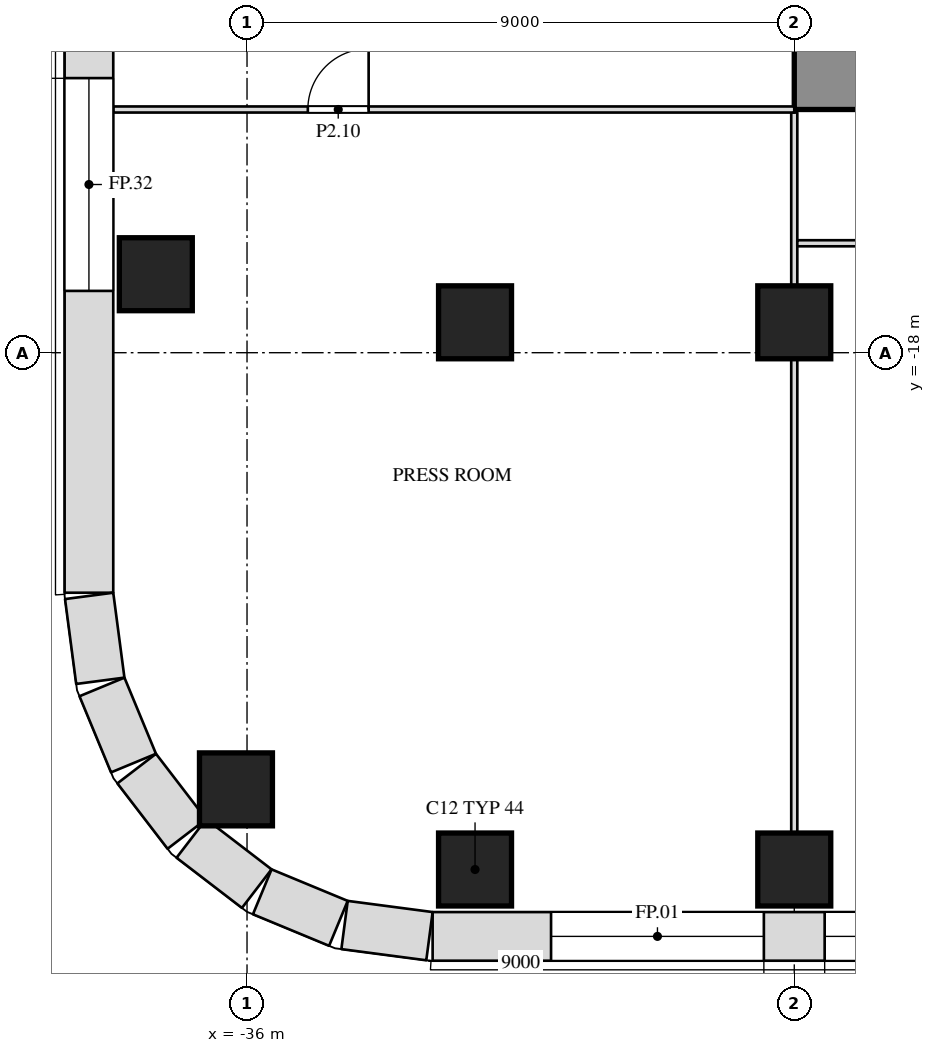
"""IFC4 building model, lengths in metres.
Left out: names, types, materials, properties, quantities, classifications, styles, units other than length and angle.
Written with IfcOpenShell. Run it as: python <this file> out.ifc"""

import sys

from ifc_helpers import new_model, si_unit, direction, frame, frame_2d, origin, origin_2d, place, context, subcontext, project, spatial, rectangle, extrude, element, fill, save


model = new_model("IFC4")
c1 = context("Model", 3, precision=1e-05, world=origin(), true_north=direction((0.0, 1.0)))
c2 = subcontext(c1, "Body", "Model", "MODEL_VIEW")
j1 = project(units=[si_unit("LENGTHUNIT", "METRE"), si_unit("PLANEANGLEUNIT", "RADIAN")], contexts=[c1])
p1 = place(None, origin())
s1 = spatial("IfcSite", under=j1, at=p1, CompositionType="ELEMENT")
p2 = place(p1, origin())
s2 = spatial("IfcBuilding", under=s1, at=p2, CompositionType="ELEMENT")
p3 = place(p2, frame((0.0, 0.0, 15.0)))
s3 = spatial("IfcBuildingStorey", under=s2, at=p3, CompositionType="ELEMENT", Elevation=15.0)
for number, where, z_axis, x_axis in (
    (1, (-32.25, -26.5, 0.0), (0.0, 0.0, 1.0), (1.0, 0.0, 0.0)),
    (2, (-27.0, -26.5, 0.0), (0.0, 0.0, 1.0), (1.0, 0.0, 0.0)),
    (3, (-36.182, -25.182, 0.0), (0.0, 0.0, 1.0), (1.0, 0.0, 0.0)),
    (4, (-32.25, -17.5, 0.0), (0.0, 0.0, 1.0), (1.0, 0.0, 0.0)),
    (5, (-27.0, -17.5, 0.0), (0.0, 0.0, 1.0), (1.0, 0.0, 0.0)),
    (6, (-37.5, -16.709, 0.0), (0.0, 0.0, 1.0), (1.0, 0.0, 0.0)),
):
    element("IfcColumn", number, at=place(p3, frame(where, z_axis=z_axis, x_axis=x_axis)), inside=s3, PredefinedType="COLUMN", context=c2, shape_type="SweptSolid", body=[
        extrude(rectangle(XDim=1.2, YDim=1.2, at=origin_2d()), origin(), (0.0, 0.0, 1.0), 6.0),
    ])
p4 = place(p3, frame((-27.0, -13.4, 0.0), z_axis=(0.0, 0.0, 1.0), x_axis=(1.0, 0.0, 0.0)))
e7 = element("IfcWall", 7, at=p4, inside=s3, PredefinedType="SHEAR", context=c2, shape_type="SweptSolid", body=[
    extrude(rectangle(XDim=54.0, YDim=1.2, at=frame_2d((27.0, 0.0))), origin(), (0.0, 0.0, 1.0), 5.7),
])
p5 = place(p4, frame((16.45, 0.0, 0.0)))
e8 = element("IfcOpeningElement", 8, at=p5, cuts=e7, PredefinedType="OPENING", context=c2, shape_type="SweptSolid", body=[
    extrude(rectangle(XDim=1.0, YDim=2.1, at=frame_2d((0.5, 1.05))), frame((0.0, 0.612, 0.0), z_axis=(0.0, -1.0, 0.0), x_axis=(1.0, 0.0, 0.0)), (0.0, 0.0, 1.0), 1.224),
])
p6 = place(p4, frame((36.55, 0.0, 0.0)))
e9 = element("IfcOpeningElement", 9, at=p6, cuts=e7, PredefinedType="OPENING", context=c2, shape_type="SweptSolid", body=[
    extrude(rectangle(XDim=1.0, YDim=2.1, at=frame_2d((0.5, 1.05))), frame((0.0, 0.612, 0.0), z_axis=(0.0, -1.0, 0.0), x_axis=(1.0, 0.0, 0.0)), (0.0, 0.0, 1.0), 1.224),
])
p7 = place(p3, frame((-27.0, -25.9, 0.0), z_axis=(0.0, 0.0, 1.0), x_axis=(0.0, 1.0, 0.0)))
e10 = element("IfcWall", 10, at=p7, inside=s3, PredefinedType="PARTITIONING", context=c2, shape_type="SweptSolid", body=[
    extrude(rectangle(XDim=7.8, YDim=0.1, at=frame_2d((3.9, 0.0))), origin(), (0.0, 0.0, 1.0), 5.088),
])
p8 = place(p3, frame((-27.0, -16.9, 0.0), z_axis=(0.0, 0.0, 1.0), x_axis=(0.0, 1.0, 0.0)))
e11 = element("IfcWall", 11, at=p8, inside=s3, PredefinedType="PARTITIONING", context=c2, shape_type="SweptSolid", body=[
    extrude(rectangle(XDim=2.85, YDim=0.1, at=frame_2d((1.425, 0.0))), origin(), (0.0, 0.0, 1.0), 5.088),
])
p9 = place(p3, frame((-26.95, -16.2, 0.0), z_axis=(0.0, 0.0, 1.0), x_axis=(1.0, 0.0, 0.0)))
e12 = element("IfcWall", 12, at=p9, inside=s3, PredefinedType="PARTITIONING", context=c2, shape_type="SweptSolid", body=[
    extrude(rectangle(XDim=53.9, YDim=0.1, at=frame_2d((26.95, 0.0))), origin(), (0.0, 0.0, 1.0), 5.7),
])
p10 = place(p9, frame((6.2, 0.0, 0.0)))
e13 = element("IfcOpeningElement", 13, at=p10, cuts=e12, PredefinedType="OPENING", context=c2, shape_type="SweptSolid", body=[
    extrude(rectangle(XDim=1.0, YDim=2.1, at=frame_2d((0.5, 1.05))), frame((0.0, 0.062, 0.0), z_axis=(0.0, -1.0, 0.0), x_axis=(1.0, 0.0, 0.0)), (0.0, 0.0, 1.0), 0.124),
])
p11 = place(p9, frame((15.2, 0.0, 0.0)))
e14 = element("IfcOpeningElement", 14, at=p11, cuts=e12, PredefinedType="OPENING", context=c2, shape_type="SweptSolid", body=[
    extrude(rectangle(XDim=1.0, YDim=2.1, at=frame_2d((0.5, 1.05))), frame((0.0, 0.062, 0.0), z_axis=(0.0, -1.0, 0.0), x_axis=(1.0, 0.0, 0.0)), (0.0, 0.0, 1.0), 0.124),
])
p12 = place(p9, frame((21.95, 0.0, 0.0)))
e15 = element("IfcOpeningElement", 15, at=p12, cuts=e12, PredefinedType="OPENING", context=c2, shape_type="SweptSolid", body=[
    extrude(rectangle(XDim=1.0, YDim=2.1, at=frame_2d((0.5, 1.05))), frame((0.0, 0.062, 0.0), z_axis=(0.0, -1.0, 0.0), x_axis=(1.0, 0.0, 0.0)), (0.0, 0.0, 1.0), 0.124),
])
p13 = place(p9, frame((30.95, 0.0, 0.0)))
e16 = element("IfcOpeningElement", 16, at=p13, cuts=e12, PredefinedType="OPENING", context=c2, shape_type="SweptSolid", body=[
    extrude(rectangle(XDim=1.0, YDim=2.1, at=frame_2d((0.5, 1.05))), frame((0.0, 0.062, 0.0), z_axis=(0.0, -1.0, 0.0), x_axis=(1.0, 0.0, 0.0)), (0.0, 0.0, 1.0), 0.124),
])
p14 = place(p9, frame((39.95, 0.0, 0.0)))
e17 = element("IfcOpeningElement", 17, at=p14, cuts=e12, PredefinedType="OPENING", context=c2, shape_type="SweptSolid", body=[
    extrude(rectangle(XDim=1.0, YDim=2.1, at=frame_2d((0.5, 1.05))), frame((0.0, 0.062, 0.0), z_axis=(0.0, -1.0, 0.0), x_axis=(1.0, 0.0, 0.0)), (0.0, 0.0, 1.0), 0.124),
])
p15 = place(p9, frame((48.95, 0.0, 0.0)))
e18 = element("IfcOpeningElement", 18, at=p15, cuts=e12, PredefinedType="OPENING", context=c2, shape_type="SweptSolid", body=[
    extrude(rectangle(XDim=1.0, YDim=2.1, at=frame_2d((0.5, 1.05))), frame((0.0, 0.062, 0.0), z_axis=(0.0, -1.0, 0.0), x_axis=(1.0, 0.0, 0.0)), (0.0, 0.0, 1.0), 0.124),
])
p16 = place(p3, frame((-38.2, -14.0, 0.0), z_axis=(0.0, 0.0, 1.0), x_axis=(1.0, 0.0, 0.0)))
e19 = element("IfcWall", 19, at=p16, inside=s3, PredefinedType="PARTITIONING", context=c2, shape_type="SweptSolid", body=[
    extrude(rectangle(XDim=11.2, YDim=0.1, at=frame_2d((5.6, 0.0))), origin(), (0.0, 0.0, 1.0), 5.7),
])
p17 = place(p16, frame((3.2, 0.0, 0.0)))
e20 = element("IfcOpeningElement", 20, at=p17, cuts=e19, PredefinedType="OPENING", context=c2, shape_type="SweptSolid", body=[
    extrude(rectangle(XDim=1.0, YDim=2.1, at=frame_2d((0.5, 1.05))), frame((0.0, 0.062, 0.0), z_axis=(0.0, -1.0, 0.0), x_axis=(1.0, 0.0, 0.0)), (0.0, 0.0, 1.0), 0.124),
])
p18 = place(p3, frame((-32.948, -27.6, 0.0), z_axis=(0.0, 0.0, 1.0), x_axis=(1.0, 0.0, 0.0)))
e21 = element("IfcWall", 21, at=p18, inside=s3, PredefinedType="SOLIDWALL", context=c2, shape_type="SweptSolid", body=[
    extrude(rectangle(XDim=65.895, YDim=0.8, at=frame_2d((32.948, 0.0))), origin(), (0.0, 0.0, 1.0), 5.7),
])
p19 = place(p18, frame((1.948, 0.0, 1.0)))
e22 = element("IfcOpeningElement", 22, at=p19, cuts=e21, PredefinedType="OPENING", context=c2, shape_type="SweptSolid", body=[
    extrude(rectangle(XDim=3.5, YDim=4.0, at=frame_2d((1.75, 2.0))), frame((0.0, 0.412, 0.0), z_axis=(0.0, -1.0, 0.0), x_axis=(1.0, 0.0, 0.0)), (0.0, 0.0, 1.0), 0.824),
])
p20 = place(p18, frame((6.448, 0.0, 1.0)))
e23 = element("IfcOpeningElement", 23, at=p20, cuts=e21, PredefinedType="OPENING", context=c2, shape_type="SweptSolid", body=[
    extrude(rectangle(XDim=3.5, YDim=4.0, at=frame_2d((1.75, 2.0))), frame((0.0, 0.412, 0.0), z_axis=(0.0, -1.0, 0.0), x_axis=(1.0, 0.0, 0.0)), (0.0, 0.0, 1.0), 0.824),
])
p21 = place(p18, frame((10.948, 0.0, 1.0)))
e24 = element("IfcOpeningElement", 24, at=p21, cuts=e21, PredefinedType="OPENING", context=c2, shape_type="SweptSolid", body=[
    extrude(rectangle(XDim=3.5, YDim=4.0, at=frame_2d((1.75, 2.0))), frame((0.0, 0.412, 0.0), z_axis=(0.0, -1.0, 0.0), x_axis=(1.0, 0.0, 0.0)), (0.0, 0.0, 1.0), 0.824),
])
p22 = place(p18, frame((15.448, 0.0, 1.0)))
e25 = element("IfcOpeningElement", 25, at=p22, cuts=e21, PredefinedType="OPENING", context=c2, shape_type="SweptSolid", body=[
    extrude(rectangle(XDim=3.5, YDim=4.0, at=frame_2d((1.75, 2.0))), frame((0.0, 0.412, 0.0), z_axis=(0.0, -1.0, 0.0), x_axis=(1.0, 0.0, 0.0)), (0.0, 0.0, 1.0), 0.824),
])
p23 = place(p18, frame((19.948, 0.0, 1.0)))
e26 = element("IfcOpeningElement", 26, at=p23, cuts=e21, PredefinedType="OPENING", context=c2, shape_type="SweptSolid", body=[
    extrude(rectangle(XDim=3.5, YDim=4.0, at=frame_2d((1.75, 2.0))), frame((0.0, 0.412, 0.0), z_axis=(0.0, -1.0, 0.0), x_axis=(1.0, 0.0, 0.0)), (0.0, 0.0, 1.0), 0.824),
])
p24 = place(p18, frame((24.448, 0.0, 1.0)))
e27 = element("IfcOpeningElement", 27, at=p24, cuts=e21, PredefinedType="OPENING", context=c2, shape_type="SweptSolid", body=[
    extrude(rectangle(XDim=3.5, YDim=4.0, at=frame_2d((1.75, 2.0))), frame((0.0, 0.412, 0.0), z_axis=(0.0, -1.0, 0.0), x_axis=(1.0, 0.0, 0.0)), (0.0, 0.0, 1.0), 0.824),
])
p25 = place(p18, frame((28.948, 0.0, 1.0)))
e28 = element("IfcOpeningElement", 28, at=p25, cuts=e21, PredefinedType="OPENING", context=c2, shape_type="SweptSolid", body=[
    extrude(rectangle(XDim=3.5, YDim=4.0, at=frame_2d((1.75, 2.0))), frame((0.0, 0.412, 0.0), z_axis=(0.0, -1.0, 0.0), x_axis=(1.0, 0.0, 0.0)), (0.0, 0.0, 1.0), 0.824),
])
p26 = place(p18, frame((33.448, 0.0, 1.0)))
e29 = element("IfcOpeningElement", 29, at=p26, cuts=e21, PredefinedType="OPENING", context=c2, shape_type="SweptSolid", body=[
    extrude(rectangle(XDim=3.5, YDim=4.0, at=frame_2d((1.75, 2.0))), frame((0.0, 0.412, 0.0), z_axis=(0.0, -1.0, 0.0), x_axis=(1.0, 0.0, 0.0)), (0.0, 0.0, 1.0), 0.824),
])
p27 = place(p18, frame((37.948, 0.0, 1.0)))
e30 = element("IfcOpeningElement", 30, at=p27, cuts=e21, PredefinedType="OPENING", context=c2, shape_type="SweptSolid", body=[
    extrude(rectangle(XDim=3.5, YDim=4.0, at=frame_2d((1.75, 2.0))), frame((0.0, 0.412, 0.0), z_axis=(0.0, -1.0, 0.0), x_axis=(1.0, 0.0, 0.0)), (0.0, 0.0, 1.0), 0.824),
])
p28 = place(p18, frame((42.448, 0.0, 1.0)))
e31 = element("IfcOpeningElement", 31, at=p28, cuts=e21, PredefinedType="OPENING", context=c2, shape_type="SweptSolid", body=[
    extrude(rectangle(XDim=3.5, YDim=4.0, at=frame_2d((1.75, 2.0))), frame((0.0, 0.412, 0.0), z_axis=(0.0, -1.0, 0.0), x_axis=(1.0, 0.0, 0.0)), (0.0, 0.0, 1.0), 0.824),
])
p29 = place(p18, frame((46.948, 0.0, 1.0)))
e32 = element("IfcOpeningElement", 32, at=p29, cuts=e21, PredefinedType="OPENING", context=c2, shape_type="SweptSolid", body=[
    extrude(rectangle(XDim=3.5, YDim=4.0, at=frame_2d((1.75, 2.0))), frame((0.0, 0.412, 0.0), z_axis=(0.0, -1.0, 0.0), x_axis=(1.0, 0.0, 0.0)), (0.0, 0.0, 1.0), 0.824),
])
p30 = place(p18, frame((51.448, 0.0, 1.0)))
e33 = element("IfcOpeningElement", 33, at=p30, cuts=e21, PredefinedType="OPENING", context=c2, shape_type="SweptSolid", body=[
    extrude(rectangle(XDim=3.5, YDim=4.0, at=frame_2d((1.75, 2.0))), frame((0.0, 0.412, 0.0), z_axis=(0.0, -1.0, 0.0), x_axis=(1.0, 0.0, 0.0)), (0.0, 0.0, 1.0), 0.824),
])
p31 = place(p18, frame((55.948, 0.0, 1.0)))
e34 = element("IfcOpeningElement", 34, at=p31, cuts=e21, PredefinedType="OPENING", context=c2, shape_type="SweptSolid", body=[
    extrude(rectangle(XDim=3.5, YDim=4.0, at=frame_2d((1.75, 2.0))), frame((0.0, 0.412, 0.0), z_axis=(0.0, -1.0, 0.0), x_axis=(1.0, 0.0, 0.0)), (0.0, 0.0, 1.0), 0.824),
])
p32 = place(p18, frame((60.448, 0.0, 1.0)))
e35 = element("IfcOpeningElement", 35, at=p32, cuts=e21, PredefinedType="OPENING", context=c2, shape_type="SweptSolid", body=[
    extrude(rectangle(XDim=3.5, YDim=4.0, at=frame_2d((1.75, 2.0))), frame((0.0, 0.412, 0.0), z_axis=(0.0, -1.0, 0.0), x_axis=(1.0, 0.0, 0.0)), (0.0, 0.0, 1.0), 0.824),
])
p33 = place(p3, frame((-38.6, 13.948, 0.0), z_axis=(0.0, 0.0, 1.0), x_axis=(0.0, -1.0, 0.0)))
e36 = element("IfcWall", 36, at=p33, inside=s3, PredefinedType="SOLIDWALL", context=c2, shape_type="SweptSolid", body=[
    extrude(rectangle(XDim=35.895, YDim=0.8, at=frame_2d((17.948, 0.0))), origin(), (0.0, 0.0, 1.0), 5.7),
])
p34 = place(p33, frame((4.964, 0.0, 1.0)))
e37 = element("IfcOpeningElement", 37, at=p34, cuts=e36, PredefinedType="OPENING", context=c2, shape_type="SweptSolid", body=[
    extrude(rectangle(XDim=3.5, YDim=4.0, at=frame_2d((1.75, 2.0))), frame((0.0, 0.412, 0.0), z_axis=(0.0, -1.0, 0.0), x_axis=(1.0, 0.0, 0.0)), (0.0, 0.0, 1.0), 0.824),
])
p35 = place(p33, frame((9.458, 0.0, 1.0)))
e38 = element("IfcOpeningElement", 38, at=p35, cuts=e36, PredefinedType="OPENING", context=c2, shape_type="SweptSolid", body=[
    extrude(rectangle(XDim=3.5, YDim=4.0, at=frame_2d((1.75, 2.0))), frame((0.0, 0.412, 0.0), z_axis=(0.0, -1.0, 0.0), x_axis=(1.0, 0.0, 0.0)), (0.0, 0.0, 1.0), 0.824),
])
p36 = place(p33, frame((13.951, 0.0, 1.0)))
e39 = element("IfcOpeningElement", 39, at=p36, cuts=e36, PredefinedType="OPENING", context=c2, shape_type="SweptSolid", body=[
    extrude(rectangle(XDim=3.5, YDim=4.0, at=frame_2d((1.75, 2.0))), frame((0.0, 0.412, 0.0), z_axis=(0.0, -1.0, 0.0), x_axis=(1.0, 0.0, 0.0)), (0.0, 0.0, 1.0), 0.824),
])
p37 = place(p33, frame((18.444, 0.0, 1.0)))
e40 = element("IfcOpeningElement", 40, at=p37, cuts=e36, PredefinedType="OPENING", context=c2, shape_type="SweptSolid", body=[
    extrude(rectangle(XDim=3.5, YDim=4.0, at=frame_2d((1.75, 2.0))), frame((0.0, 0.412, 0.0), z_axis=(0.0, -1.0, 0.0), x_axis=(1.0, 0.0, 0.0)), (0.0, 0.0, 1.0), 0.824),
])
p38 = place(p33, frame((22.938, 0.0, 1.0)))
e41 = element("IfcOpeningElement", 41, at=p38, cuts=e36, PredefinedType="OPENING", context=c2, shape_type="SweptSolid", body=[
    extrude(rectangle(XDim=3.5, YDim=4.0, at=frame_2d((1.75, 2.0))), frame((0.0, 0.412, 0.0), z_axis=(0.0, -1.0, 0.0), x_axis=(1.0, 0.0, 0.0)), (0.0, 0.0, 1.0), 0.824),
])
p39 = place(p33, frame((27.431, 0.0, 1.0)))
e42 = element("IfcOpeningElement", 42, at=p39, cuts=e36, PredefinedType="OPENING", context=c2, shape_type="SweptSolid", body=[
    extrude(rectangle(XDim=3.5, YDim=4.0, at=frame_2d((1.75, 2.0))), frame((0.0, 0.412, 0.0), z_axis=(0.0, -1.0, 0.0), x_axis=(1.0, 0.0, 0.0)), (0.0, 0.0, 1.0), 0.824),
])
p40 = place(p3, frame((-38.597, -22.0, 0.0), z_axis=(0.0, 0.0, 1.0), x_axis=(0.130517283865, -0.99144603414, 0.0)))
e43 = element("IfcWall", 43, at=p40, inside=s3, PredefinedType="SOLIDWALL", context=c2, shape_type="SweptSolid", body=[
    extrude(rectangle(XDim=1.408, YDim=0.8, at=frame_2d((0.704, 0.0))), origin(), (0.0, 0.0, 1.0), 5.7),
])
p41 = place(p3, frame((-38.386, -23.497, 0.0), z_axis=(0.0, 0.0, 1.0), x_axis=(0.38276009378, -0.923847774587, 0.0)))
e44 = element("IfcWall", 44, at=p41, inside=s3, PredefinedType="SOLIDWALL", context=c2, shape_type="SweptSolid", body=[
    extrude(rectangle(XDim=1.355, YDim=0.8, at=frame_2d((0.678, 0.0))), origin(), (0.0, 0.0, 1.0), 5.7),
])
for number, where, z_axis, x_axis in (
    (45, (-37.815, -24.84, 0.0), (0.0, 0.0, 1.0), (0.609, -0.793, 0.0)),
    (46, (-36.916, -25.989, 0.0), (0.0, 0.0, 1.0), (0.793, -0.609, 0.0)),
):
    element("IfcWall", number, at=place(p3, frame(where, z_axis=z_axis, x_axis=x_axis)), inside=s3, PredefinedType="SOLIDWALL", context=c2, shape_type="SweptSolid", body=[
        extrude(rectangle(XDim=1.356, YDim=0.8, at=frame_2d((0.678, 0.0))), origin(), (0.0, 0.0, 1.0), 5.7),
    ])
p42 = place(p3, frame((-35.75, -26.867, 0.0), z_axis=(0.0, 0.0, 1.0), x_axis=(0.923847774587, -0.38276009378, 0.0)))
e47 = element("IfcWall", 47, at=p42, inside=s3, PredefinedType="SOLIDWALL", context=c2, shape_type="SweptSolid", body=[
    extrude(rectangle(XDim=1.355, YDim=0.8, at=frame_2d((0.678, 0.0))), origin(), (0.0, 0.0, 1.0), 5.7),
])
p43 = place(p3, frame((-34.396, -27.413, 0.0), z_axis=(0.0, 0.0, 1.0), x_axis=(0.99144603414, -0.130517283865, 0.0)))
e48 = element("IfcWall", 48, at=p43, inside=s3, PredefinedType="SOLIDWALL", context=c2, shape_type="SweptSolid", body=[
    extrude(rectangle(XDim=1.408, YDim=0.8, at=frame_2d((0.704, 0.0))), origin(), (0.0, 0.0, 1.0), 5.7),
])
p44 = place(p17, origin())
e49 = element("IfcDoor", 49, at=p44, inside=s3, OperationType="SINGLE_SWING_RIGHT", PredefinedType="DOOR", context=c2, shape_type="SweptSolid", body=[
    extrude(rectangle(XDim=1.0, YDim=2.1, at=frame_2d((0.5, 1.05))), frame((0.0, 0.025, 0.0), z_axis=(0.0, -1.0, 0.0), x_axis=(1.0, 0.0, 0.0)), (0.0, 0.0, 1.0), 0.05),
])
fill(e20, e49)
p45 = place(p19, origin())
e50 = element("IfcWindow", 50, at=p45, inside=s3, PartitioningType="SINGLE_PANEL", PredefinedType="WINDOW", context=c2, shape_type="SweptSolid", body=[
    extrude(rectangle(XDim=3.5, YDim=4.0, at=frame_2d((1.75, 2.0))), frame((0.0, 0.03, 0.0), z_axis=(0.0, -1.0, 0.0), x_axis=(1.0, 0.0, 0.0)), (0.0, 0.0, 1.0), 0.06),
])
fill(e22, e50)
p46 = place(p20, origin())
e51 = element("IfcWindow", 51, at=p46, inside=s3, PartitioningType="SINGLE_PANEL", PredefinedType="WINDOW", context=c2, shape_type="SweptSolid", body=[
    extrude(rectangle(XDim=3.5, YDim=4.0, at=frame_2d((1.75, 2.0))), frame((0.0, 0.03, 0.0), z_axis=(0.0, -1.0, 0.0), x_axis=(1.0, 0.0, 0.0)), (0.0, 0.0, 1.0), 0.06),
])
fill(e23, e51)
p47 = place(p39, origin())
e52 = element("IfcWindow", 52, at=p47, inside=s3, PartitioningType="SINGLE_PANEL", PredefinedType="WINDOW", context=c2, shape_type="SweptSolid", body=[
    extrude(rectangle(XDim=3.5, YDim=4.0, at=frame_2d((1.75, 2.0))), frame((0.0, 0.03, 0.0), z_axis=(0.0, -1.0, 0.0), x_axis=(1.0, 0.0, 0.0)), (0.0, 0.0, 1.0), 0.06),
])
fill(e42, e52)
save(model, sys.argv[1])
